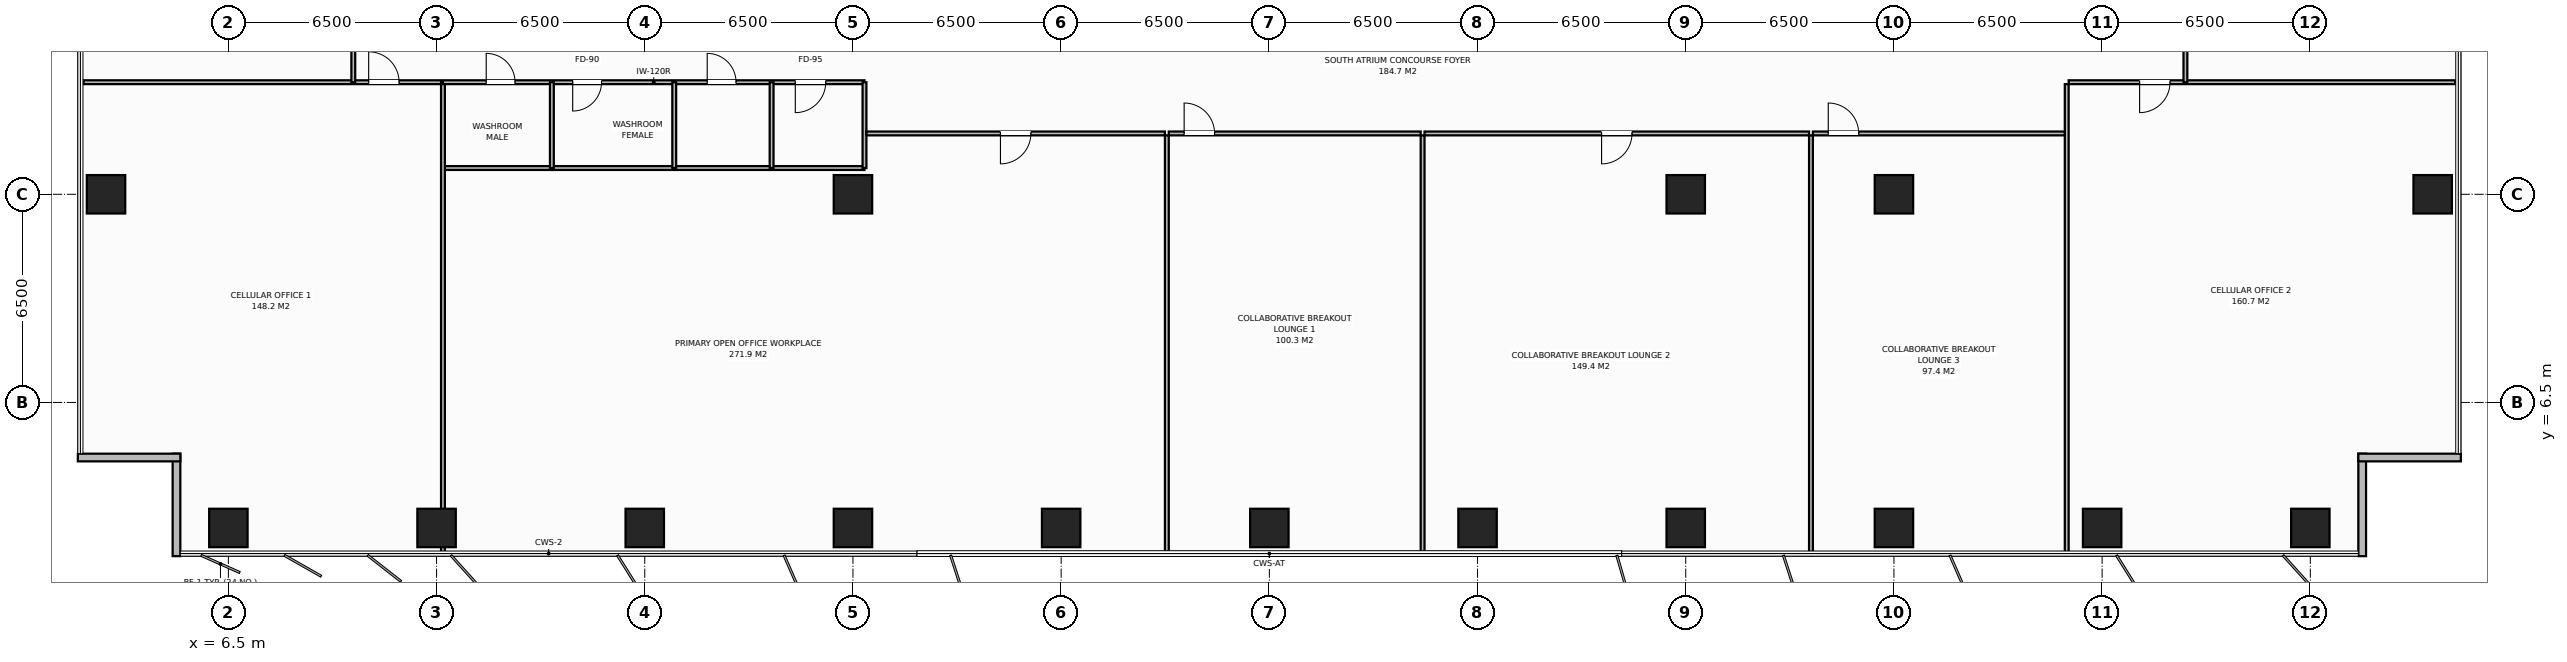
"""IFC4 building model, lengths in metres.
Left out: names, types, materials, properties, quantities, classifications, styles, units other than length and angle.
Written with IfcOpenShell. Run it as: python <this file> out.ifc"""

import sys

from ifc_helpers import new_model, si_unit, direction, frame, frame_2d, origin, origin_2d, place, context, subcontext, project, spatial, rectangle, extrude, element, fill, save


model = new_model("IFC4")
c1 = context("Model", 3, precision=1e-05, world=origin(), true_north=direction((0.0, 1.0)))
c2 = subcontext(c1, "Body", "Model", "MODEL_VIEW")
j1 = project(units=[si_unit("LENGTHUNIT", "METRE"), si_unit("PLANEANGLEUNIT", "RADIAN")], contexts=[c1])
p1 = place(None, origin())
s1 = spatial("IfcSite", under=j1, at=p1, CompositionType="ELEMENT")
p2 = place(p1, origin())
s2 = spatial("IfcBuilding", under=s1, at=p2, CompositionType="ELEMENT")
p3 = place(p2, frame((0.0, 0.0, 124.0)))
s3 = spatial("IfcBuildingStorey", under=s2, at=p3, CompositionType="ELEMENT", Elevation=124.0)
for number, where, z_axis, x_axis in (
    (1, (58.5, 13.0, 0.0), (0.0, 0.0, 1.0), (1.0, 0.0, 0.0)),
    (2, (26.0, 13.0, 0.0), (0.0, 0.0, 1.0), (1.0, 0.0, 0.0)),
    (3, (52.0, 13.0, 0.0), (0.0, 0.0, 1.0), (1.0, 0.0, 0.0)),
    (4, (6.5, 2.58, 0.0), (0.0, 0.0, 1.0), (1.0, 0.0, 0.0)),
    (5, (13.0, 2.58, 0.0), (0.0, 0.0, 1.0), (1.0, 0.0, 0.0)),
    (6, (19.5, 2.58, 0.0), (0.0, 0.0, 1.0), (1.0, 0.0, 0.0)),
    (7, (26.0, 2.58, 0.0), (0.0, 0.0, 1.0), (1.0, 0.0, 0.0)),
    (8, (32.5, 2.58, 0.0), (0.0, 0.0, 1.0), (1.0, 0.0, 0.0)),
    (9, (39.0, 2.58, 0.0), (0.0, 0.0, 1.0), (1.0, 0.0, 0.0)),
    (10, (45.5, 2.58, 0.0), (0.0, 0.0, 1.0), (1.0, 0.0, 0.0)),
    (11, (52.0, 2.58, 0.0), (0.0, 0.0, 1.0), (1.0, 0.0, 0.0)),
    (12, (58.5, 2.58, 0.0), (0.0, 0.0, 1.0), (1.0, 0.0, 0.0)),
    (13, (65.0, 2.58, 0.0), (0.0, 0.0, 1.0), (1.0, 0.0, 0.0)),
    (14, (71.5, 2.58, 0.0), (0.0, 0.0, 1.0), (1.0, 0.0, 0.0)),
    (15, (2.68, 13.0, 0.0), (0.0, 0.0, 1.0), (1.0, 0.0, 0.0)),
    (16, (75.32, 13.0, 0.0), (0.0, 0.0, 1.0), (1.0, 0.0, 0.0)),
):
    element("IfcColumn", number, at=place(p3, frame(where, z_axis=z_axis, x_axis=x_axis)), inside=s3, PredefinedType="COLUMN", context=c2, shape_type="SweptSolid", body=[
        extrude(rectangle(XDim=1.2, YDim=1.2, at=origin_2d()), origin(), (0.0, 0.0, 1.0), 3.8),
    ])
for number, where, z_axis, x_axis in (
    (17, (4.88, 1.7, 0.0), (0.0, 0.0, 1.0), (0.0, 1.0, 0.0)),
    (18, (5.0, 4.78, 0.0), (0.0, 0.0, 1.0), (-1.0, 0.0, 0.0)),
    (19, (73.12, 4.9, 0.0), (0.0, 0.0, 1.0), (0.0, -1.0, 0.0)),
    (20, (76.2, 4.78, 0.0), (0.0, 0.0, 1.0), (-1.0, 0.0, 0.0)),
):
    element("IfcWall", number, at=place(p3, frame(where, z_axis=z_axis, x_axis=x_axis)), inside=s3, PredefinedType="STANDARD", context=c2, shape_type="SweptSolid", body=[
        extrude(rectangle(XDim=3.2, YDim=0.24, at=frame_2d((1.6, 0.0))), origin(), (0.0, 0.0, 1.0), 3.565),
    ])
p4 = place(p3, frame((13.2, 16.5, 0.0), z_axis=(0.0, 0.0, 1.0), x_axis=(1.0, 0.0, 0.0)))
e21 = element("IfcWall", 21, at=p4, inside=s3, PredefinedType="PARTITIONING", context=c2, shape_type="SweptSolid", body=[
    extrude(rectangle(XDim=13.16, YDim=0.12, at=frame_2d((6.58, 0.0))), origin(), (0.0, 0.0, 1.0), 3.565),
])
p5 = place(p4, frame((1.35, 0.0, 0.0)))
e22 = element("IfcOpeningElement", 22, at=p5, cuts=e21, PredefinedType="OPENING", context=c2, shape_type="SweptSolid", body=[
    extrude(rectangle(XDim=0.9, YDim=2.15, at=frame_2d((0.45, 1.075))), frame((0.0, 0.07, 0.0), z_axis=(0.0, -1.0, 0.0), x_axis=(1.0, 0.0, 0.0)), (0.0, 0.0, 1.0), 0.14),
])
p6 = place(p4, frame((4.05, 0.0, 0.0)))
e23 = element("IfcOpeningElement", 23, at=p6, cuts=e21, PredefinedType="OPENING", context=c2, shape_type="SweptSolid", body=[
    extrude(rectangle(XDim=0.9, YDim=2.15, at=frame_2d((0.45, 1.075))), frame((0.0, 0.07, 0.0), z_axis=(0.0, -1.0, 0.0), x_axis=(1.0, 0.0, 0.0)), (0.0, 0.0, 1.0), 0.14),
])
p7 = place(p4, frame((8.25, 0.0, 0.0)))
e24 = element("IfcOpeningElement", 24, at=p7, cuts=e21, PredefinedType="OPENING", context=c2, shape_type="SweptSolid", body=[
    extrude(rectangle(XDim=0.9, YDim=2.15, at=frame_2d((0.45, 1.075))), frame((0.0, 0.07, 0.0), z_axis=(0.0, -1.0, 0.0), x_axis=(1.0, 0.0, 0.0)), (0.0, 0.0, 1.0), 0.14),
])
p8 = place(p4, frame((11.0, 0.0, 0.0)))
e25 = element("IfcOpeningElement", 25, at=p8, cuts=e21, PredefinedType="OPENING", context=c2, shape_type="SweptSolid", body=[
    extrude(rectangle(XDim=0.95, YDim=2.15, at=frame_2d((0.475, 1.075))), frame((0.0, 0.07, 0.0), z_axis=(0.0, -1.0, 0.0), x_axis=(1.0, 0.0, 0.0)), (0.0, 0.0, 1.0), 0.14),
])
p9 = place(p3, frame((13.2, 13.82, 0.0), z_axis=(0.0, 0.0, 1.0), x_axis=(1.0, 0.0, 0.0)))
e26 = element("IfcWall", 26, at=p9, inside=s3, PredefinedType="PARTITIONING", context=c2, shape_type="SweptSolid", body=[
    extrude(rectangle(XDim=13.16, YDim=0.12, at=frame_2d((6.58, 0.0))), origin(), (0.0, 0.0, 1.0), 3.565),
])
for number, where, z_axis, x_axis in (
    (27, (16.6, 13.82, 0.0), (0.0, 0.0, 1.0), (0.0, 1.0, 0.0)),
    (28, (20.42, 13.82, 0.0), (0.0, 0.0, 1.0), (0.0, 1.0, 0.0)),
    (29, (23.46, 13.82, 0.0), (0.0, 0.0, 1.0), (0.0, 1.0, 0.0)),
    (30, (26.36, 13.82, 0.0), (0.0, 0.0, 1.0), (0.0, 1.0, 0.0)),
):
    element("IfcWall", number, at=place(p3, frame(where, z_axis=z_axis, x_axis=x_axis)), inside=s3, PredefinedType="PARTITIONING", context=c2, shape_type="SweptSolid", body=[
        extrude(rectangle(XDim=2.68, YDim=0.12, at=frame_2d((1.34, 0.0))), origin(), (0.0, 0.0, 1.0), 3.565),
    ])
p10 = place(p3, frame((13.2, 1.72, 0.0), z_axis=(0.0, 0.0, 1.0), x_axis=(0.0, 1.0, 0.0)))
e31 = element("IfcWall", 31, at=p10, inside=s3, PredefinedType="PARTITIONING", context=c2, shape_type="SweptSolid", body=[
    extrude(rectangle(XDim=14.72, YDim=0.12, at=frame_2d((7.36, 0.0))), origin(), (0.0, 0.0, 1.0), 2.965),
])
p11 = place(p3, frame((1.98, 16.5, 0.0), z_axis=(0.0, 0.0, 1.0), x_axis=(1.0, 0.0, 0.0)))
e32 = element("IfcWall", 32, at=p11, inside=s3, PredefinedType="PARTITIONING", context=c2, shape_type="SweptSolid", body=[
    extrude(rectangle(XDim=11.16, YDim=0.12, at=frame_2d((5.58, 0.0))), origin(), (0.0, 0.0, 1.0), 3.565),
])
p12 = place(p11, frame((8.9, 0.0, 0.0)))
e33 = element("IfcOpeningElement", 33, at=p12, cuts=e32, PredefinedType="OPENING", context=c2, shape_type="SweptSolid", body=[
    extrude(rectangle(XDim=0.95, YDim=2.15, at=frame_2d((0.475, 1.075))), frame((0.0, 0.07, 0.0), z_axis=(0.0, -1.0, 0.0), x_axis=(1.0, 0.0, 0.0)), (0.0, 0.0, 1.0), 0.14),
])
p13 = place(p3, frame((35.8, 1.72, 0.0), z_axis=(0.0, 0.0, 1.0), x_axis=(0.0, 1.0, 0.0)))
e34 = element("IfcWall", 34, at=p13, inside=s3, PredefinedType="PARTITIONING", context=c2, shape_type="SweptSolid", body=[
    extrude(rectangle(XDim=13.12, YDim=0.12, at=frame_2d((6.56, 0.0))), origin(), (0.0, 0.0, 1.0), 3.565),
])
p14 = place(p3, frame((26.42, 14.9, 0.0), z_axis=(0.0, 0.0, 1.0), x_axis=(1.0, 0.0, 0.0)))
e35 = element("IfcWall", 35, at=p14, inside=s3, PredefinedType="PARTITIONING", context=c2, shape_type="SweptSolid", body=[
    extrude(rectangle(XDim=9.32, YDim=0.12, at=frame_2d((4.66, 0.0))), origin(), (0.0, 0.0, 1.0), 3.565),
])
p15 = place(p14, frame((4.185, 0.0, 0.0)))
e36 = element("IfcOpeningElement", 36, at=p15, cuts=e35, PredefinedType="OPENING", context=c2, shape_type="SweptSolid", body=[
    extrude(rectangle(XDim=0.95, YDim=2.15, at=frame_2d((0.475, 1.075))), frame((0.0, 0.07, 0.0), z_axis=(0.0, -1.0, 0.0), x_axis=(1.0, 0.0, 0.0)), (0.0, 0.0, 1.0), 0.14),
])
p16 = place(p3, frame((43.785, 1.72, 0.0), z_axis=(0.0, 0.0, 1.0), x_axis=(0.0, 1.0, 0.0)))
e37 = element("IfcWall", 37, at=p16, inside=s3, PredefinedType="PARTITIONING", context=c2, shape_type="SweptSolid", body=[
    extrude(rectangle(XDim=13.12, YDim=0.12, at=frame_2d((6.56, 0.0))), origin(), (0.0, 0.0, 1.0), 3.565),
])
p17 = place(p3, frame((35.86, 14.9, 0.0), z_axis=(0.0, 0.0, 1.0), x_axis=(1.0, 0.0, 0.0)))
e38 = element("IfcWall", 38, at=p17, inside=s3, PredefinedType="PARTITIONING", context=c2, shape_type="SweptSolid", body=[
    extrude(rectangle(XDim=7.865, YDim=0.12, at=frame_2d((3.932, 0.0))), origin(), (0.0, 0.0, 1.0), 3.565),
])
p18 = place(p17, frame((0.48, 0.0, 0.0)))
e39 = element("IfcOpeningElement", 39, at=p18, cuts=e38, PredefinedType="OPENING", context=c2, shape_type="SweptSolid", body=[
    extrude(rectangle(XDim=0.95, YDim=2.15, at=frame_2d((0.475, 1.075))), frame((0.0, 0.07, 0.0), z_axis=(0.0, -1.0, 0.0), x_axis=(1.0, 0.0, 0.0)), (0.0, 0.0, 1.0), 0.14),
])
p19 = place(p3, frame((55.91, 1.72, 0.0), z_axis=(0.0, 0.0, 1.0), x_axis=(0.0, 1.0, 0.0)))
e40 = element("IfcWall", 40, at=p19, inside=s3, PredefinedType="PARTITIONING", context=c2, shape_type="SweptSolid", body=[
    extrude(rectangle(XDim=13.12, YDim=0.12, at=frame_2d((6.56, 0.0))), origin(), (0.0, 0.0, 1.0), 3.565),
])
p20 = place(p3, frame((43.845, 14.9, 0.0), z_axis=(0.0, 0.0, 1.0), x_axis=(1.0, 0.0, 0.0)))
e41 = element("IfcWall", 41, at=p20, inside=s3, PredefinedType="PARTITIONING", context=c2, shape_type="SweptSolid", body=[
    extrude(rectangle(XDim=12.005, YDim=0.12, at=frame_2d((6.002, 0.0))), origin(), (0.0, 0.0, 1.0), 3.565),
])
p21 = place(p20, frame((5.528, 0.0, 0.0)))
e42 = element("IfcOpeningElement", 42, at=p21, cuts=e41, PredefinedType="OPENING", context=c2, shape_type="SweptSolid", body=[
    extrude(rectangle(XDim=0.95, YDim=2.15, at=frame_2d((0.475, 1.075))), frame((0.0, 0.07, 0.0), z_axis=(0.0, -1.0, 0.0), x_axis=(1.0, 0.0, 0.0)), (0.0, 0.0, 1.0), 0.14),
])
p22 = place(p3, frame((63.895, 1.72, 0.0), z_axis=(0.0, 0.0, 1.0), x_axis=(0.0, 1.0, 0.0)))
e43 = element("IfcWall", 43, at=p22, inside=s3, PredefinedType="PARTITIONING", context=c2, shape_type="SweptSolid", body=[
    extrude(rectangle(XDim=14.72, YDim=0.12, at=frame_2d((7.36, 0.0))), origin(), (0.0, 0.0, 1.0), 3.565),
])
p23 = place(p3, frame((55.97, 14.9, 0.0), z_axis=(0.0, 0.0, 1.0), x_axis=(1.0, 0.0, 0.0)))
e44 = element("IfcWall", 44, at=p23, inside=s3, PredefinedType="PARTITIONING", context=c2, shape_type="SweptSolid", body=[
    extrude(rectangle(XDim=7.865, YDim=0.12, at=frame_2d((3.933, 0.0))), origin(), (0.0, 0.0, 1.0), 3.565),
])
p24 = place(p23, frame((0.48, 0.0, 0.0)))
e45 = element("IfcOpeningElement", 45, at=p24, cuts=e44, PredefinedType="OPENING", context=c2, shape_type="SweptSolid", body=[
    extrude(rectangle(XDim=0.95, YDim=2.15, at=frame_2d((0.475, 1.075))), frame((0.0, 0.07, 0.0), z_axis=(0.0, -1.0, 0.0), x_axis=(1.0, 0.0, 0.0)), (0.0, 0.0, 1.0), 0.14),
])
p25 = place(p3, frame((63.955, 16.5, 0.0), z_axis=(0.0, 0.0, 1.0), x_axis=(1.0, 0.0, 0.0)))
e46 = element("IfcWall", 46, at=p25, inside=s3, PredefinedType="PARTITIONING", context=c2, shape_type="SweptSolid", body=[
    extrude(rectangle(XDim=12.065, YDim=0.12, at=frame_2d((6.033, 0.0))), origin(), (0.0, 0.0, 1.0), 3.565),
])
p26 = place(p25, frame((2.215, 0.0, 0.0)))
e47 = element("IfcOpeningElement", 47, at=p26, cuts=e46, PredefinedType="OPENING", context=c2, shape_type="SweptSolid", body=[
    extrude(rectangle(XDim=0.95, YDim=2.15, at=frame_2d((0.475, 1.075))), frame((0.0, 0.07, 0.0), z_axis=(0.0, -1.0, 0.0), x_axis=(1.0, 0.0, 0.0)), (0.0, 0.0, 1.0), 0.14),
])
p27 = place(p3, frame((10.4, 16.5, 0.0), z_axis=(0.0, 0.0, 1.0), x_axis=(0.0, 1.0, 0.0)))
e48 = element("IfcWall", 48, at=p27, inside=s3, PredefinedType="PARTITIONING", context=c2, shape_type="SweptSolid", body=[
    extrude(rectangle(XDim=6.333, YDim=0.12, at=frame_2d((3.167, 0.0))), origin(), (0.0, 0.0, 1.0), 3.565),
])
p28 = place(p27, frame((3.742, 0.0, 0.0)))
e49 = element("IfcOpeningElement", 49, at=p28, cuts=e48, PredefinedType="OPENING", context=c2, shape_type="SweptSolid", body=[
    extrude(rectangle(XDim=0.95, YDim=2.15, at=frame_2d((0.475, 1.075))), frame((0.0, 0.07, 0.0), z_axis=(0.0, -1.0, 0.0), x_axis=(1.0, 0.0, 0.0)), (0.0, 0.0, 1.0), 0.14),
])
p29 = place(p3, frame((67.6, 16.5, 0.0), z_axis=(0.0, 0.0, 1.0), x_axis=(0.0, 1.0, 0.0)))
e50 = element("IfcWall", 50, at=p29, inside=s3, PredefinedType="PARTITIONING", context=c2, shape_type="SweptSolid", body=[
    extrude(rectangle(XDim=19.0, YDim=0.12, at=frame_2d((9.5, 0.0))), origin(), (0.0, 0.0, 1.0), 3.565),
])
p30 = place(p29, frame((9.025, 0.0, 0.0)))
e51 = element("IfcOpeningElement", 51, at=p30, cuts=e50, PredefinedType="OPENING", context=c2, shape_type="SweptSolid", body=[
    extrude(rectangle(XDim=0.95, YDim=2.15, at=frame_2d((0.475, 1.075))), frame((0.0, 0.07, 0.0), z_axis=(0.0, -1.0, 0.0), x_axis=(1.0, 0.0, 0.0)), (0.0, 0.0, 1.0), 0.14),
])
p31 = place(p5, origin())
e52 = element("IfcDoor", 52, at=p31, inside=s3, OperationType="SINGLE_SWING_LEFT", PredefinedType="DOOR", context=c2, shape_type="SweptSolid", body=[
    extrude(rectangle(XDim=0.9, YDim=2.15, at=frame_2d((0.45, 1.075))), frame((0.0, 0.025, 0.0), z_axis=(0.0, -1.0, 0.0), x_axis=(1.0, 0.0, 0.0)), (0.0, 0.0, 1.0), 0.05),
])
fill(e22, e52)
p32 = place(p6, origin())
e53 = element("IfcDoor", 53, at=p32, inside=s3, OperationType="SINGLE_SWING_RIGHT", PredefinedType="DOOR", context=c2, shape_type="SweptSolid", body=[
    extrude(rectangle(XDim=0.9, YDim=2.15, at=frame_2d((0.45, 1.075))), frame((0.0, 0.025, 0.0), z_axis=(0.0, -1.0, 0.0), x_axis=(1.0, 0.0, 0.0)), (0.0, 0.0, 1.0), 0.05),
])
fill(e23, e53)
p33 = place(p7, origin())
e54 = element("IfcDoor", 54, at=p33, inside=s3, OperationType="SINGLE_SWING_LEFT", PredefinedType="DOOR", context=c2, shape_type="SweptSolid", body=[
    extrude(rectangle(XDim=0.9, YDim=2.15, at=frame_2d((0.45, 1.075))), frame((0.0, 0.025, 0.0), z_axis=(0.0, -1.0, 0.0), x_axis=(1.0, 0.0, 0.0)), (0.0, 0.0, 1.0), 0.05),
])
fill(e24, e54)
p34 = place(p8, origin())
e55 = element("IfcDoor", 55, at=p34, inside=s3, OperationType="SINGLE_SWING_RIGHT", PredefinedType="DOOR", context=c2, shape_type="SweptSolid", body=[
    extrude(rectangle(XDim=0.95, YDim=2.15, at=frame_2d((0.475, 1.075))), frame((0.0, 0.025, 0.0), z_axis=(0.0, -1.0, 0.0), x_axis=(1.0, 0.0, 0.0)), (0.0, 0.0, 1.0), 0.05),
])
fill(e25, e55)
p35 = place(p12, origin())
e56 = element("IfcDoor", 56, at=p35, inside=s3, OperationType="SINGLE_SWING_LEFT", PredefinedType="DOOR", context=c2, shape_type="SweptSolid", body=[
    extrude(rectangle(XDim=0.95, YDim=2.15, at=frame_2d((0.475, 1.075))), frame((0.0, 0.025, 0.0), z_axis=(0.0, -1.0, 0.0), x_axis=(1.0, 0.0, 0.0)), (0.0, 0.0, 1.0), 0.05),
])
fill(e33, e56)
p36 = place(p15, origin())
e57 = element("IfcDoor", 57, at=p36, inside=s3, OperationType="SINGLE_SWING_RIGHT", PredefinedType="DOOR", context=c2, shape_type="SweptSolid", body=[
    extrude(rectangle(XDim=0.95, YDim=2.15, at=frame_2d((0.475, 1.075))), frame((0.0, 0.025, 0.0), z_axis=(0.0, -1.0, 0.0), x_axis=(1.0, 0.0, 0.0)), (0.0, 0.0, 1.0), 0.05),
])
fill(e36, e57)
p37 = place(p18, origin())
e58 = element("IfcDoor", 58, at=p37, inside=s3, OperationType="SINGLE_SWING_LEFT", PredefinedType="DOOR", context=c2, shape_type="SweptSolid", body=[
    extrude(rectangle(XDim=0.95, YDim=2.15, at=frame_2d((0.475, 1.075))), frame((0.0, 0.025, 0.0), z_axis=(0.0, -1.0, 0.0), x_axis=(1.0, 0.0, 0.0)), (0.0, 0.0, 1.0), 0.05),
])
fill(e39, e58)
p38 = place(p21, origin())
e59 = element("IfcDoor", 59, at=p38, inside=s3, OperationType="SINGLE_SWING_RIGHT", PredefinedType="DOOR", context=c2, shape_type="SweptSolid", body=[
    extrude(rectangle(XDim=0.95, YDim=2.15, at=frame_2d((0.475, 1.075))), frame((0.0, 0.025, 0.0), z_axis=(0.0, -1.0, 0.0), x_axis=(1.0, 0.0, 0.0)), (0.0, 0.0, 1.0), 0.05),
])
fill(e42, e59)
p39 = place(p24, origin())
e60 = element("IfcDoor", 60, at=p39, inside=s3, OperationType="SINGLE_SWING_LEFT", PredefinedType="DOOR", context=c2, shape_type="SweptSolid", body=[
    extrude(rectangle(XDim=0.95, YDim=2.15, at=frame_2d((0.475, 1.075))), frame((0.0, 0.025, 0.0), z_axis=(0.0, -1.0, 0.0), x_axis=(1.0, 0.0, 0.0)), (0.0, 0.0, 1.0), 0.05),
])
fill(e45, e60)
p40 = place(p26, origin())
e61 = element("IfcDoor", 61, at=p40, inside=s3, OperationType="SINGLE_SWING_RIGHT", PredefinedType="DOOR", context=c2, shape_type="SweptSolid", body=[
    extrude(rectangle(XDim=0.95, YDim=2.15, at=frame_2d((0.475, 1.075))), frame((0.0, 0.025, 0.0), z_axis=(0.0, -1.0, 0.0), x_axis=(1.0, 0.0, 0.0)), (0.0, 0.0, 1.0), 0.05),
])
fill(e47, e61)
save(model, sys.argv[1])
